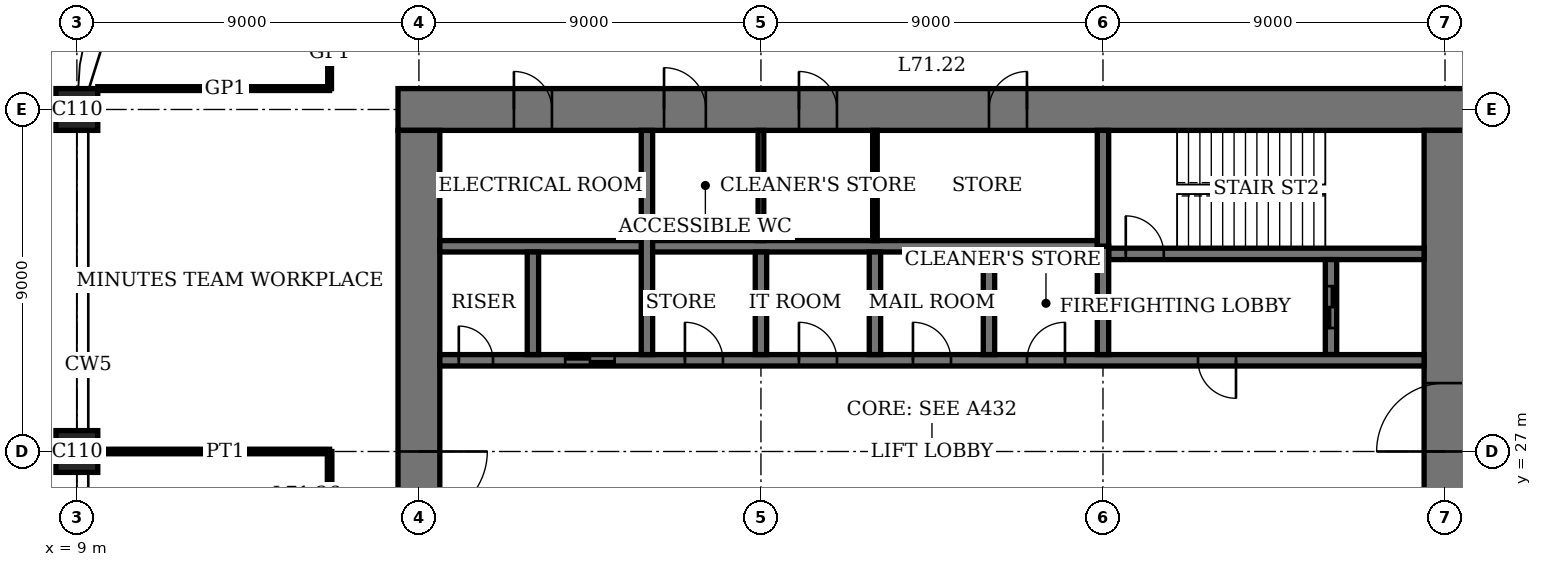
"""IFC4 building model, lengths in metres.
Left out: names, types, materials, properties, quantities, classifications, styles, units other than length and angle.
Written with IfcOpenShell. Run it as: python <this file> out.ifc"""

import sys

from ifc_helpers import new_model, si_unit, direction, frame, frame_2d, origin, origin_2d, place, context, subcontext, project, spatial, rectangle, extrude, element, fill, save


model = new_model("IFC4")
c1 = context("Model", 3, precision=1e-05, world=origin(), true_north=direction((0.0, 1.0)))
c2 = subcontext(c1, "Body", "Model", "MODEL_VIEW")
j1 = project(units=[si_unit("LENGTHUNIT", "METRE"), si_unit("PLANEANGLEUNIT", "RADIAN")], contexts=[c1])
p1 = place(None, origin())
s1 = spatial("IfcSite", under=j1, at=p1, CompositionType="ELEMENT")
p2 = place(p1, origin())
s2 = spatial("IfcBuilding", under=s1, at=p2, CompositionType="ELEMENT")
p3 = place(p2, frame((0.0, 0.0, 291.4)))
s3 = spatial("IfcBuildingStorey", under=s2, at=p3, CompositionType="ELEMENT", Elevation=291.4)
for number, where, z_axis, x_axis in (
    (1, (9.0, 27.0, 0.0), (0.0, 0.0, 1.0), (1.0, 0.0, 0.0)),
    (2, (9.0, 36.0, 0.0), (0.0, 0.0, 1.0), (1.0, 0.0, 0.0)),
):
    element("IfcColumn", number, at=place(p3, frame(where, z_axis=z_axis, x_axis=x_axis)), inside=s3, PredefinedType="COLUMN", context=c2, shape_type="SweptSolid", body=[
        extrude(rectangle(XDim=1.1, YDim=1.1, at=origin_2d()), origin(), (0.0, 0.0, 1.0), 4.0),
    ])
p4 = place(p3, frame((45.55, 36.0, 0.0), z_axis=(0.0, 0.0, 1.0), x_axis=(-1.0, 0.0, 0.0)))
e3 = element("IfcWall", 3, at=p4, inside=s3, PredefinedType="SHEAR", context=c2, shape_type="SweptSolid", body=[
    extrude(rectangle(XDim=28.1, YDim=1.1, at=frame_2d((14.05, 0.0))), origin(), (0.0, 0.0, 1.0), 4.0),
])
p5 = place(p4, frame((11.55, 0.0, 0.0)))
e4 = element("IfcOpeningElement", 4, at=p5, cuts=e3, PredefinedType="OPENING", context=c2, shape_type="SweptSolid", body=[
    extrude(rectangle(XDim=1.0, YDim=2.4, at=frame_2d((0.5, 1.2))), frame((0.0, 0.56, 0.0), z_axis=(0.0, -1.0, 0.0), x_axis=(1.0, 0.0, 0.0)), (0.0, 0.0, 1.0), 1.12),
])
p6 = place(p4, frame((16.55, 0.0, 0.0)))
e5 = element("IfcOpeningElement", 5, at=p6, cuts=e3, PredefinedType="OPENING", context=c2, shape_type="SweptSolid", body=[
    extrude(rectangle(XDim=1.0, YDim=2.4, at=frame_2d((0.5, 1.2))), frame((0.0, 0.56, 0.0), z_axis=(0.0, -1.0, 0.0), x_axis=(1.0, 0.0, 0.0)), (0.0, 0.0, 1.0), 1.12),
])
p7 = place(p4, frame((20.0, 0.0, 0.0)))
e6 = element("IfcOpeningElement", 6, at=p7, cuts=e3, PredefinedType="OPENING", context=c2, shape_type="SweptSolid", body=[
    extrude(rectangle(XDim=1.1, YDim=2.4, at=frame_2d((0.55, 1.2))), frame((0.0, 0.56, 0.0), z_axis=(0.0, -1.0, 0.0), x_axis=(1.0, 0.0, 0.0)), (0.0, 0.0, 1.0), 1.12),
])
p8 = place(p4, frame((24.05, 0.0, 0.0)))
e7 = element("IfcOpeningElement", 7, at=p8, cuts=e3, PredefinedType="OPENING", context=c2, shape_type="SweptSolid", body=[
    extrude(rectangle(XDim=1.0, YDim=2.4, at=frame_2d((0.5, 1.2))), frame((0.0, 0.56, 0.0), z_axis=(0.0, -1.0, 0.0), x_axis=(1.0, 0.0, 0.0)), (0.0, 0.0, 1.0), 1.12),
])
p9 = place(p3, frame((18.0, 35.45, 0.0), z_axis=(0.0, 0.0, 1.0), x_axis=(0.0, -1.0, 0.0)))
e8 = element("IfcWall", 8, at=p9, inside=s3, PredefinedType="SHEAR", context=c2, shape_type="SweptSolid", body=[
    extrude(rectangle(XDim=16.9, YDim=1.1, at=frame_2d((8.45, 0.0))), origin(), (0.0, 0.0, 1.0), 4.0),
])
p10 = place(p9, frame((8.45, 0.0, 0.0)))
e9 = element("IfcOpeningElement", 9, at=p10, cuts=e8, PredefinedType="OPENING", context=c2, shape_type="SweptSolid", body=[
    extrude(rectangle(XDim=1.8, YDim=2.4, at=frame_2d((0.9, 1.2))), frame((0.0, 0.56, 0.0), z_axis=(0.0, -1.0, 0.0), x_axis=(1.0, 0.0, 0.0)), (0.0, 0.0, 1.0), 1.12),
])
p11 = place(p3, frame((45.0, 18.55, 0.0), z_axis=(0.0, 0.0, 1.0), x_axis=(0.0, 1.0, 0.0)))
e10 = element("IfcWall", 10, at=p11, inside=s3, PredefinedType="SHEAR", context=c2, shape_type="SweptSolid", body=[
    extrude(rectangle(XDim=16.9, YDim=1.1, at=frame_2d((8.45, 0.0))), origin(), (0.0, 0.0, 1.0), 4.0),
])
p12 = place(p11, frame((8.45, 0.0, 0.0)))
e11 = element("IfcOpeningElement", 11, at=p12, cuts=e10, PredefinedType="OPENING", context=c2, shape_type="SweptSolid", body=[
    extrude(rectangle(XDim=1.8, YDim=2.4, at=frame_2d((0.9, 1.2))), frame((0.0, 0.56, 0.0), z_axis=(0.0, -1.0, 0.0), x_axis=(1.0, 0.0, 0.0)), (0.0, 0.0, 1.0), 1.12),
])
p13 = place(p3, frame((36.15, 32.2, 0.0), z_axis=(0.0, 0.0, 1.0), x_axis=(1.0, 0.0, 0.0)))
e12 = element("IfcWall", 12, at=p13, inside=s3, PredefinedType="SHEAR", context=c2, shape_type="SweptSolid", body=[
    extrude(rectangle(XDim=8.3, YDim=0.3, at=frame_2d((4.15, 0.0))), origin(), (0.0, 0.0, 1.0), 4.0),
])
p14 = place(p13, frame((0.45, 0.0, 0.0)))
e13 = element("IfcOpeningElement", 13, at=p14, cuts=e12, PredefinedType="OPENING", context=c2, shape_type="SweptSolid", body=[
    extrude(rectangle(XDim=1.0, YDim=2.4, at=frame_2d((0.5, 1.2))), frame((0.0, 0.16, 0.0), z_axis=(0.0, -1.0, 0.0), x_axis=(1.0, 0.0, 0.0)), (0.0, 0.0, 1.0), 0.32),
])
p15 = place(p3, frame((36.0, 32.4, 0.0), z_axis=(0.0, 0.0, 1.0), x_axis=(0.0, 1.0, 0.0)))
e14 = element("IfcWall", 14, at=p15, inside=s3, PredefinedType="SHEAR", context=c2, shape_type="SweptSolid", body=[
    extrude(rectangle(XDim=3.05, YDim=0.3, at=frame_2d((1.525, 0.0))), origin(), (0.0, 0.0, 1.0), 4.0),
])
p16 = place(p3, frame((42.0, 29.55, 0.0), z_axis=(0.0, 0.0, 1.0), x_axis=(0.0, 1.0, 0.0)))
e15 = element("IfcWall", 15, at=p16, inside=s3, PredefinedType="SHEAR", context=c2, shape_type="SweptSolid", body=[
    extrude(rectangle(XDim=2.5, YDim=0.3, at=frame_2d((1.25, 0.0))), origin(), (0.0, 0.0, 1.0), 4.0),
])
p17 = place(p16, frame((0.7, 0.0, 0.0)))
e16 = element("IfcOpeningElement", 16, at=p17, cuts=e15, PredefinedType="OPENING", context=c2, shape_type="SweptSolid", body=[
    extrude(rectangle(XDim=1.1, YDim=2.4, at=frame_2d((0.55, 1.2))), frame((0.0, 0.16, 0.0), z_axis=(0.0, -1.0, 0.0), x_axis=(1.0, 0.0, 0.0)), (0.0, 0.0, 1.0), 0.32),
])
p18 = place(p3, frame((18.55, 29.4, 0.0), z_axis=(0.0, 0.0, 1.0), x_axis=(1.0, 0.0, 0.0)))
e17 = element("IfcWall", 17, at=p18, inside=s3, PredefinedType="SHEAR", context=c2, shape_type="SweptSolid", body=[
    extrude(rectangle(XDim=25.9, YDim=0.3, at=frame_2d((12.95, 0.0))), origin(), (0.0, 0.0, 1.0), 4.0),
])
p19 = place(p18, frame((19.95, 0.0, 0.0)))
e18 = element("IfcOpeningElement", 18, at=p19, cuts=e17, PredefinedType="OPENING", context=c2, shape_type="SweptSolid", body=[
    extrude(rectangle(XDim=1.0, YDim=2.4, at=frame_2d((0.5, 1.2))), frame((0.0, 0.16, 0.0), z_axis=(0.0, -1.0, 0.0), x_axis=(1.0, 0.0, 0.0)), (0.0, 0.0, 1.0), 0.32),
])
p20 = place(p18, frame((0.5, 0.0, 0.0)))
e19 = element("IfcOpeningElement", 19, at=p20, cuts=e17, PredefinedType="OPENING", context=c2, shape_type="SweptSolid", body=[
    extrude(rectangle(XDim=0.9, YDim=2.1, at=frame_2d((0.45, 1.05))), frame((0.0, 0.16, 0.0), z_axis=(0.0, -1.0, 0.0), x_axis=(1.0, 0.0, 0.0)), (0.0, 0.0, 1.0), 0.32),
])
p21 = place(p18, frame((15.45, 0.0, 0.0)))
e20 = element("IfcOpeningElement", 20, at=p21, cuts=e17, PredefinedType="OPENING", context=c2, shape_type="SweptSolid", body=[
    extrude(rectangle(XDim=1.0, YDim=2.4, at=frame_2d((0.5, 1.2))), frame((0.0, 0.16, 0.0), z_axis=(0.0, -1.0, 0.0), x_axis=(1.0, 0.0, 0.0)), (0.0, 0.0, 1.0), 0.32),
])
p22 = place(p18, frame((12.45, 0.0, 0.0)))
e21 = element("IfcOpeningElement", 21, at=p22, cuts=e17, PredefinedType="OPENING", context=c2, shape_type="SweptSolid", body=[
    extrude(rectangle(XDim=1.0, YDim=2.4, at=frame_2d((0.5, 1.2))), frame((0.0, 0.16, 0.0), z_axis=(0.0, -1.0, 0.0), x_axis=(1.0, 0.0, 0.0)), (0.0, 0.0, 1.0), 0.32),
])
p23 = place(p18, frame((9.45, 0.0, 0.0)))
e22 = element("IfcOpeningElement", 22, at=p23, cuts=e17, PredefinedType="OPENING", context=c2, shape_type="SweptSolid", body=[
    extrude(rectangle(XDim=1.0, YDim=2.4, at=frame_2d((0.5, 1.2))), frame((0.0, 0.16, 0.0), z_axis=(0.0, -1.0, 0.0), x_axis=(1.0, 0.0, 0.0)), (0.0, 0.0, 1.0), 0.32),
])
p24 = place(p18, frame((6.45, 0.0, 0.0)))
e23 = element("IfcOpeningElement", 23, at=p24, cuts=e17, PredefinedType="OPENING", context=c2, shape_type="SweptSolid", body=[
    extrude(rectangle(XDim=1.0, YDim=2.4, at=frame_2d((0.5, 1.2))), frame((0.0, 0.16, 0.0), z_axis=(0.0, -1.0, 0.0), x_axis=(1.0, 0.0, 0.0)), (0.0, 0.0, 1.0), 0.32),
])
p25 = place(p18, frame((3.3, 0.0, 0.0)))
e24 = element("IfcOpeningElement", 24, at=p25, cuts=e17, PredefinedType="OPENING", context=c2, shape_type="SweptSolid", body=[
    extrude(rectangle(XDim=1.3, YDim=2.4, at=frame_2d((0.65, 1.2))), frame((0.0, 0.16, 0.0), z_axis=(0.0, -1.0, 0.0), x_axis=(1.0, 0.0, 0.0)), (0.0, 0.0, 1.0), 0.32),
])
p26 = place(p3, frame((18.55, 32.4, 0.0), z_axis=(0.0, 0.0, 1.0), x_axis=(1.0, 0.0, 0.0)))
e25 = element("IfcWall", 25, at=p26, inside=s3, PredefinedType="SHEAR", context=c2, shape_type="SweptSolid", body=[
    extrude(rectangle(XDim=17.3, YDim=0.3, at=frame_2d((8.65, 0.0))), origin(), (0.0, 0.0, 1.0), 4.0),
])
for number, where, z_axis, x_axis in (
    (26, (33.0, 29.55, 0.0), (0.0, 0.0, 1.0), (0.0, 1.0, 0.0)),
    (27, (30.0, 29.55, 0.0), (0.0, 0.0, 1.0), (0.0, 1.0, 0.0)),
    (28, (27.0, 29.55, 0.0), (0.0, 0.0, 1.0), (0.0, 1.0, 0.0)),
):
    element("IfcWall", number, at=place(p3, frame(where, z_axis=z_axis, x_axis=x_axis)), inside=s3, PredefinedType="SHEAR", context=c2, shape_type="SweptSolid", body=[
        extrude(rectangle(XDim=2.7, YDim=0.3, at=frame_2d((1.35, 0.0))), origin(), (0.0, 0.0, 1.0), 4.0),
    ])
p27 = place(p3, frame((24.0, 29.55, 0.0), z_axis=(0.0, 0.0, 1.0), x_axis=(0.0, 1.0, 0.0)))
e29 = element("IfcWall", 29, at=p27, inside=s3, PredefinedType="SHEAR", context=c2, shape_type="SweptSolid", body=[
    extrude(rectangle(XDim=5.9, YDim=0.3, at=frame_2d((2.95, 0.0))), origin(), (0.0, 0.0, 1.0), 4.0),
])
p28 = place(p3, frame((21.0, 29.55, 0.0), z_axis=(0.0, 0.0, 1.0), x_axis=(0.0, 1.0, 0.0)))
e30 = element("IfcWall", 30, at=p28, inside=s3, PredefinedType="SHEAR", context=c2, shape_type="SweptSolid", body=[
    extrude(rectangle(XDim=2.7, YDim=0.3, at=frame_2d((1.35, 0.0))), origin(), (0.0, 0.0, 1.0), 4.0),
])
p29 = place(p3, frame((36.0, 29.55, 0.0), z_axis=(0.0, 0.0, 1.0), x_axis=(0.0, 1.0, 0.0)))
e31 = element("IfcWall", 31, at=p29, inside=s3, PredefinedType="SHEAR", context=c2, shape_type="SweptSolid", body=[
    extrude(rectangle(XDim=2.85, YDim=0.3, at=frame_2d((1.425, 0.0))), origin(), (0.0, 0.0, 1.0), 4.0),
])
p30 = place(p3, frame((9.55, 27.0, 0.0), z_axis=(0.0, 0.0, 1.0), x_axis=(1.0, 0.0, 0.0)))
e32 = element("IfcWall", 32, at=p30, inside=s3, PredefinedType="PARTITIONING", context=c2, shape_type="SweptSolid", body=[
    extrude(rectangle(XDim=6.1, YDim=0.12, at=frame_2d((3.05, 0.0))), origin(), (0.0, 0.0, 1.0), 3.05),
])
p31 = place(p3, frame((9.55, 36.55, 0.0), z_axis=(0.0, 0.0, 1.0), x_axis=(1.0, 0.0, 0.0)))
e33 = element("IfcWall", 33, at=p31, inside=s3, PredefinedType="PARTITIONING", context=c2, shape_type="SweptSolid", body=[
    extrude(rectangle(XDim=6.1, YDim=0.1, at=frame_2d((3.05, 0.0))), origin(), (0.0, 0.0, 1.0), 3.75),
])
p32 = place(p3, frame((15.65, 22.5, 0.0), z_axis=(0.0, 0.0, 1.0), x_axis=(0.0, 1.0, 0.0)))
e34 = element("IfcWall", 34, at=p32, inside=s3, PredefinedType="PARTITIONING", context=c2, shape_type="SweptSolid", body=[
    extrude(rectangle(XDim=4.5, YDim=0.12, at=frame_2d((2.25, 0.0))), origin(), (0.0, 0.0, 1.0), 3.75),
])
p33 = place(p32, frame((1.75, 0.0, 0.0)))
e35 = element("IfcOpeningElement", 35, at=p33, cuts=e34, PredefinedType="OPENING", context=c2, shape_type="SweptSolid", body=[
    extrude(rectangle(XDim=1.0, YDim=2.4, at=frame_2d((0.5, 1.2))), frame((0.0, 0.07, 0.0), z_axis=(0.0, -1.0, 0.0), x_axis=(1.0, 0.0, 0.0)), (0.0, 0.0, 1.0), 0.14),
])
p34 = place(p3, frame((15.65, 36.55, 0.0), z_axis=(0.0, 0.0, 1.0), x_axis=(0.0, 1.0, 0.0)))
e36 = element("IfcWall", 36, at=p34, inside=s3, PredefinedType="PARTITIONING", context=c2, shape_type="SweptSolid", body=[
    extrude(rectangle(XDim=1.85, YDim=0.1, at=frame_2d((0.925, 0.0))), origin(), (0.0, 0.0, 1.0), 3.75),
])
p35 = place(p3, frame((30.0, 32.55, 0.0), z_axis=(0.0, 0.0, 1.0), x_axis=(0.0, 1.0, 0.0)))
e37 = element("IfcWall", 37, at=p35, inside=s3, PredefinedType="PARTITIONING", context=c2, shape_type="SweptSolid", body=[
    extrude(rectangle(XDim=2.9, YDim=0.12, at=frame_2d((1.45, 0.0))), origin(), (0.0, 0.0, 1.0), 3.75),
])
p36 = place(p3, frame((27.0, 32.55, 0.0), z_axis=(0.0, 0.0, 1.0), x_axis=(0.0, 1.0, 0.0)))
e38 = element("IfcWall", 38, at=p36, inside=s3, PredefinedType="PARTITIONING", context=c2, shape_type="SweptSolid", body=[
    extrude(rectangle(XDim=2.9, YDim=0.15, at=frame_2d((1.45, 0.0))), origin(), (0.0, 0.0, 1.0), 3.75),
])
p37 = place(p10, origin())
e39 = element("IfcDoor", 39, at=p37, inside=s3, OperationType="DOUBLE_DOOR_DOUBLE_SWING", PredefinedType="DOOR", context=c2, shape_type="SweptSolid", body=[
    extrude(rectangle(XDim=1.8, YDim=2.4, at=frame_2d((0.9, 1.2))), frame((0.0, 0.03, 0.0), z_axis=(0.0, -1.0, 0.0), x_axis=(1.0, 0.0, 0.0)), (0.0, 0.0, 1.0), 0.06),
    extrude(rectangle(XDim=0.04, YDim=2.4, at=frame_2d((0.02, 1.2))), frame((0.0, 0.55, 0.0), z_axis=(0.0, -1.0, 0.0), x_axis=(1.0, 0.0, 0.0)), (0.0, 0.0, 1.0), 1.1),
    extrude(rectangle(XDim=0.04, YDim=2.4, at=frame_2d((1.78, 1.2))), frame((0.0, 0.55, 0.0), z_axis=(0.0, -1.0, 0.0), x_axis=(1.0, 0.0, 0.0)), (0.0, 0.0, 1.0), 1.1),
    extrude(rectangle(XDim=1.8, YDim=0.04, at=frame_2d((0.9, 2.38))), frame((0.0, 0.55, 0.0), z_axis=(0.0, -1.0, 0.0), x_axis=(1.0, 0.0, 0.0)), (0.0, 0.0, 1.0), 1.1),
])
fill(e9, e39)
p38 = place(p12, origin())
e40 = element("IfcDoor", 40, at=p38, inside=s3, OperationType="DOUBLE_DOOR_DOUBLE_SWING", PredefinedType="DOOR", context=c2, shape_type="SweptSolid", body=[
    extrude(rectangle(XDim=1.8, YDim=2.4, at=frame_2d((0.9, 1.2))), frame((0.0, 0.03, 0.0), z_axis=(0.0, -1.0, 0.0), x_axis=(1.0, 0.0, 0.0)), (0.0, 0.0, 1.0), 0.06),
    extrude(rectangle(XDim=0.04, YDim=2.4, at=frame_2d((0.02, 1.2))), frame((0.0, 0.55, 0.0), z_axis=(0.0, -1.0, 0.0), x_axis=(1.0, 0.0, 0.0)), (0.0, 0.0, 1.0), 1.1),
    extrude(rectangle(XDim=0.04, YDim=2.4, at=frame_2d((1.78, 1.2))), frame((0.0, 0.55, 0.0), z_axis=(0.0, -1.0, 0.0), x_axis=(1.0, 0.0, 0.0)), (0.0, 0.0, 1.0), 1.1),
    extrude(rectangle(XDim=1.8, YDim=0.04, at=frame_2d((0.9, 2.38))), frame((0.0, 0.55, 0.0), z_axis=(0.0, -1.0, 0.0), x_axis=(1.0, 0.0, 0.0)), (0.0, 0.0, 1.0), 1.1),
])
fill(e11, e40)
p39 = place(p5, origin())
e41 = element("IfcDoor", 41, at=p39, inside=s3, OperationType="SINGLE_SWING_LEFT", PredefinedType="DOOR", context=c2, shape_type="SweptSolid", body=[
    extrude(rectangle(XDim=1.0, YDim=2.4, at=frame_2d((0.5, 1.2))), frame((0.0, 0.025, 0.0), z_axis=(0.0, -1.0, 0.0), x_axis=(1.0, 0.0, 0.0)), (0.0, 0.0, 1.0), 0.05),
    extrude(rectangle(XDim=0.04, YDim=2.4, at=frame_2d((0.02, 1.2))), frame((0.0, 0.4, 0.0), z_axis=(0.0, -1.0, 0.0), x_axis=(1.0, 0.0, 0.0)), (0.0, 0.0, 1.0), 0.8),
    extrude(rectangle(XDim=0.04, YDim=2.4, at=frame_2d((0.98, 1.2))), frame((0.0, 0.4, 0.0), z_axis=(0.0, -1.0, 0.0), x_axis=(1.0, 0.0, 0.0)), (0.0, 0.0, 1.0), 0.8),
    extrude(rectangle(XDim=1.0, YDim=0.04, at=frame_2d((0.5, 2.38))), frame((0.0, 0.4, 0.0), z_axis=(0.0, -1.0, 0.0), x_axis=(1.0, 0.0, 0.0)), (0.0, 0.0, 1.0), 0.8),
])
fill(e4, e41)
p40 = place(p6, origin())
e42 = element("IfcDoor", 42, at=p40, inside=s3, OperationType="SINGLE_SWING_RIGHT", PredefinedType="DOOR", context=c2, shape_type="SweptSolid", body=[
    extrude(rectangle(XDim=1.0, YDim=2.4, at=frame_2d((0.5, 1.2))), frame((0.0, 0.025, 0.0), z_axis=(0.0, -1.0, 0.0), x_axis=(1.0, 0.0, 0.0)), (0.0, 0.0, 1.0), 0.05),
    extrude(rectangle(XDim=0.04, YDim=2.4, at=frame_2d((0.02, 1.2))), frame((0.0, 0.4, 0.0), z_axis=(0.0, -1.0, 0.0), x_axis=(1.0, 0.0, 0.0)), (0.0, 0.0, 1.0), 0.8),
    extrude(rectangle(XDim=0.04, YDim=2.4, at=frame_2d((0.98, 1.2))), frame((0.0, 0.4, 0.0), z_axis=(0.0, -1.0, 0.0), x_axis=(1.0, 0.0, 0.0)), (0.0, 0.0, 1.0), 0.8),
    extrude(rectangle(XDim=1.0, YDim=0.04, at=frame_2d((0.5, 2.38))), frame((0.0, 0.4, 0.0), z_axis=(0.0, -1.0, 0.0), x_axis=(1.0, 0.0, 0.0)), (0.0, 0.0, 1.0), 0.8),
])
fill(e5, e42)
p41 = place(p7, origin())
e43 = element("IfcDoor", 43, at=p41, inside=s3, OperationType="SINGLE_SWING_RIGHT", PredefinedType="DOOR", context=c2, shape_type="SweptSolid", body=[
    extrude(rectangle(XDim=1.1, YDim=2.4, at=frame_2d((0.55, 1.2))), frame((0.0, 0.025, 0.0), z_axis=(0.0, -1.0, 0.0), x_axis=(1.0, 0.0, 0.0)), (0.0, 0.0, 1.0), 0.05),
    extrude(rectangle(XDim=0.04, YDim=2.4, at=frame_2d((0.02, 1.2))), frame((0.0, 0.44, 0.0), z_axis=(0.0, -1.0, 0.0), x_axis=(1.0, 0.0, 0.0)), (0.0, 0.0, 1.0), 0.88),
    extrude(rectangle(XDim=0.04, YDim=2.4, at=frame_2d((1.08, 1.2))), frame((0.0, 0.44, 0.0), z_axis=(0.0, -1.0, 0.0), x_axis=(1.0, 0.0, 0.0)), (0.0, 0.0, 1.0), 0.88),
    extrude(rectangle(XDim=1.1, YDim=0.04, at=frame_2d((0.55, 2.38))), frame((0.0, 0.44, 0.0), z_axis=(0.0, -1.0, 0.0), x_axis=(1.0, 0.0, 0.0)), (0.0, 0.0, 1.0), 0.88),
])
fill(e6, e43)
p42 = place(p8, origin())
e44 = element("IfcDoor", 44, at=p42, inside=s3, OperationType="SINGLE_SWING_RIGHT", PredefinedType="DOOR", context=c2, shape_type="SweptSolid", body=[
    extrude(rectangle(XDim=1.0, YDim=2.4, at=frame_2d((0.5, 1.2))), frame((0.0, 0.025, 0.0), z_axis=(0.0, -1.0, 0.0), x_axis=(1.0, 0.0, 0.0)), (0.0, 0.0, 1.0), 0.05),
    extrude(rectangle(XDim=0.04, YDim=2.4, at=frame_2d((0.02, 1.2))), frame((0.0, 0.4, 0.0), z_axis=(0.0, -1.0, 0.0), x_axis=(1.0, 0.0, 0.0)), (0.0, 0.0, 1.0), 0.8),
    extrude(rectangle(XDim=0.04, YDim=2.4, at=frame_2d((0.98, 1.2))), frame((0.0, 0.4, 0.0), z_axis=(0.0, -1.0, 0.0), x_axis=(1.0, 0.0, 0.0)), (0.0, 0.0, 1.0), 0.8),
    extrude(rectangle(XDim=1.0, YDim=0.04, at=frame_2d((0.5, 2.38))), frame((0.0, 0.4, 0.0), z_axis=(0.0, -1.0, 0.0), x_axis=(1.0, 0.0, 0.0)), (0.0, 0.0, 1.0), 0.8),
])
fill(e7, e44)
p43 = place(p14, origin())
e45 = element("IfcDoor", 45, at=p43, inside=s3, OperationType="SINGLE_SWING_RIGHT", PredefinedType="DOOR", context=c2, shape_type="SweptSolid", body=[
    extrude(rectangle(XDim=1.0, YDim=2.4, at=frame_2d((0.5, 1.2))), frame((0.0, 0.03, 0.0), z_axis=(0.0, -1.0, 0.0), x_axis=(1.0, 0.0, 0.0)), (0.0, 0.0, 1.0), 0.06),
])
fill(e13, e45)
p44 = place(p19, origin())
e46 = element("IfcDoor", 46, at=p44, inside=s3, OperationType="SINGLE_SWING_RIGHT", PredefinedType="DOOR", context=c2, shape_type="SweptSolid", body=[
    extrude(rectangle(XDim=1.0, YDim=2.4, at=frame_2d((0.5, 1.2))), frame((0.0, 0.03, 0.0), z_axis=(0.0, -1.0, 0.0), x_axis=(1.0, 0.0, 0.0)), (0.0, 0.0, 1.0), 0.06),
])
fill(e18, e46)
p45 = place(p20, origin())
e47 = element("IfcDoor", 47, at=p45, inside=s3, OperationType="SINGLE_SWING_RIGHT", PredefinedType="DOOR", context=c2, shape_type="SweptSolid", body=[
    extrude(rectangle(XDim=0.9, YDim=2.1, at=frame_2d((0.45, 1.05))), frame((0.0, 0.03, 0.0), z_axis=(0.0, -1.0, 0.0), x_axis=(1.0, 0.0, 0.0)), (0.0, 0.0, 1.0), 0.06),
])
fill(e19, e47)
p46 = place(p21, origin())
e48 = element("IfcDoor", 48, at=p46, inside=s3, OperationType="SINGLE_SWING_LEFT", PredefinedType="DOOR", context=c2, shape_type="SweptSolid", body=[
    extrude(rectangle(XDim=1.0, YDim=2.4, at=frame_2d((0.5, 1.2))), frame((0.0, 0.03, 0.0), z_axis=(0.0, -1.0, 0.0), x_axis=(1.0, 0.0, 0.0)), (0.0, 0.0, 1.0), 0.06),
])
fill(e20, e48)
p47 = place(p22, origin())
e49 = element("IfcDoor", 49, at=p47, inside=s3, OperationType="SINGLE_SWING_RIGHT", PredefinedType="DOOR", context=c2, shape_type="SweptSolid", body=[
    extrude(rectangle(XDim=1.0, YDim=2.4, at=frame_2d((0.5, 1.2))), frame((0.0, 0.03, 0.0), z_axis=(0.0, -1.0, 0.0), x_axis=(1.0, 0.0, 0.0)), (0.0, 0.0, 1.0), 0.06),
])
fill(e21, e49)
p48 = place(p23, origin())
e50 = element("IfcDoor", 50, at=p48, inside=s3, OperationType="SINGLE_SWING_RIGHT", PredefinedType="DOOR", context=c2, shape_type="SweptSolid", body=[
    extrude(rectangle(XDim=1.0, YDim=2.4, at=frame_2d((0.5, 1.2))), frame((0.0, 0.03, 0.0), z_axis=(0.0, -1.0, 0.0), x_axis=(1.0, 0.0, 0.0)), (0.0, 0.0, 1.0), 0.06),
])
fill(e22, e50)
p49 = place(p24, origin())
e51 = element("IfcDoor", 51, at=p49, inside=s3, OperationType="SINGLE_SWING_RIGHT", PredefinedType="DOOR", context=c2, shape_type="SweptSolid", body=[
    extrude(rectangle(XDim=1.0, YDim=2.4, at=frame_2d((0.5, 1.2))), frame((0.0, 0.03, 0.0), z_axis=(0.0, -1.0, 0.0), x_axis=(1.0, 0.0, 0.0)), (0.0, 0.0, 1.0), 0.06),
])
fill(e23, e51)
p50 = place(p25, origin())
e52 = element("IfcDoor", 52, at=p50, inside=s3, OperationType="DOUBLE_DOOR_SLIDING", PredefinedType="DOOR", context=c2, shape_type="SweptSolid", body=[
    extrude(rectangle(XDim=1.3, YDim=2.4, at=frame_2d((0.65, 1.2))), frame((0.0, 0.02, 0.0), z_axis=(0.0, -1.0, 0.0), x_axis=(1.0, 0.0, 0.0)), (0.0, 0.0, 1.0), 0.04),
])
fill(e24, e52)
p51 = place(p17, origin())
e53 = element("IfcDoor", 53, at=p51, inside=s3, OperationType="DOUBLE_DOOR_SLIDING", PredefinedType="DOOR", context=c2, shape_type="SweptSolid", body=[
    extrude(rectangle(XDim=1.1, YDim=2.4, at=frame_2d((0.55, 1.2))), frame((0.0, 0.03, 0.0), z_axis=(0.0, -1.0, 0.0), x_axis=(1.0, 0.0, 0.0)), (0.0, 0.0, 1.0), 0.06),
])
fill(e16, e53)
save(model, sys.argv[1])
